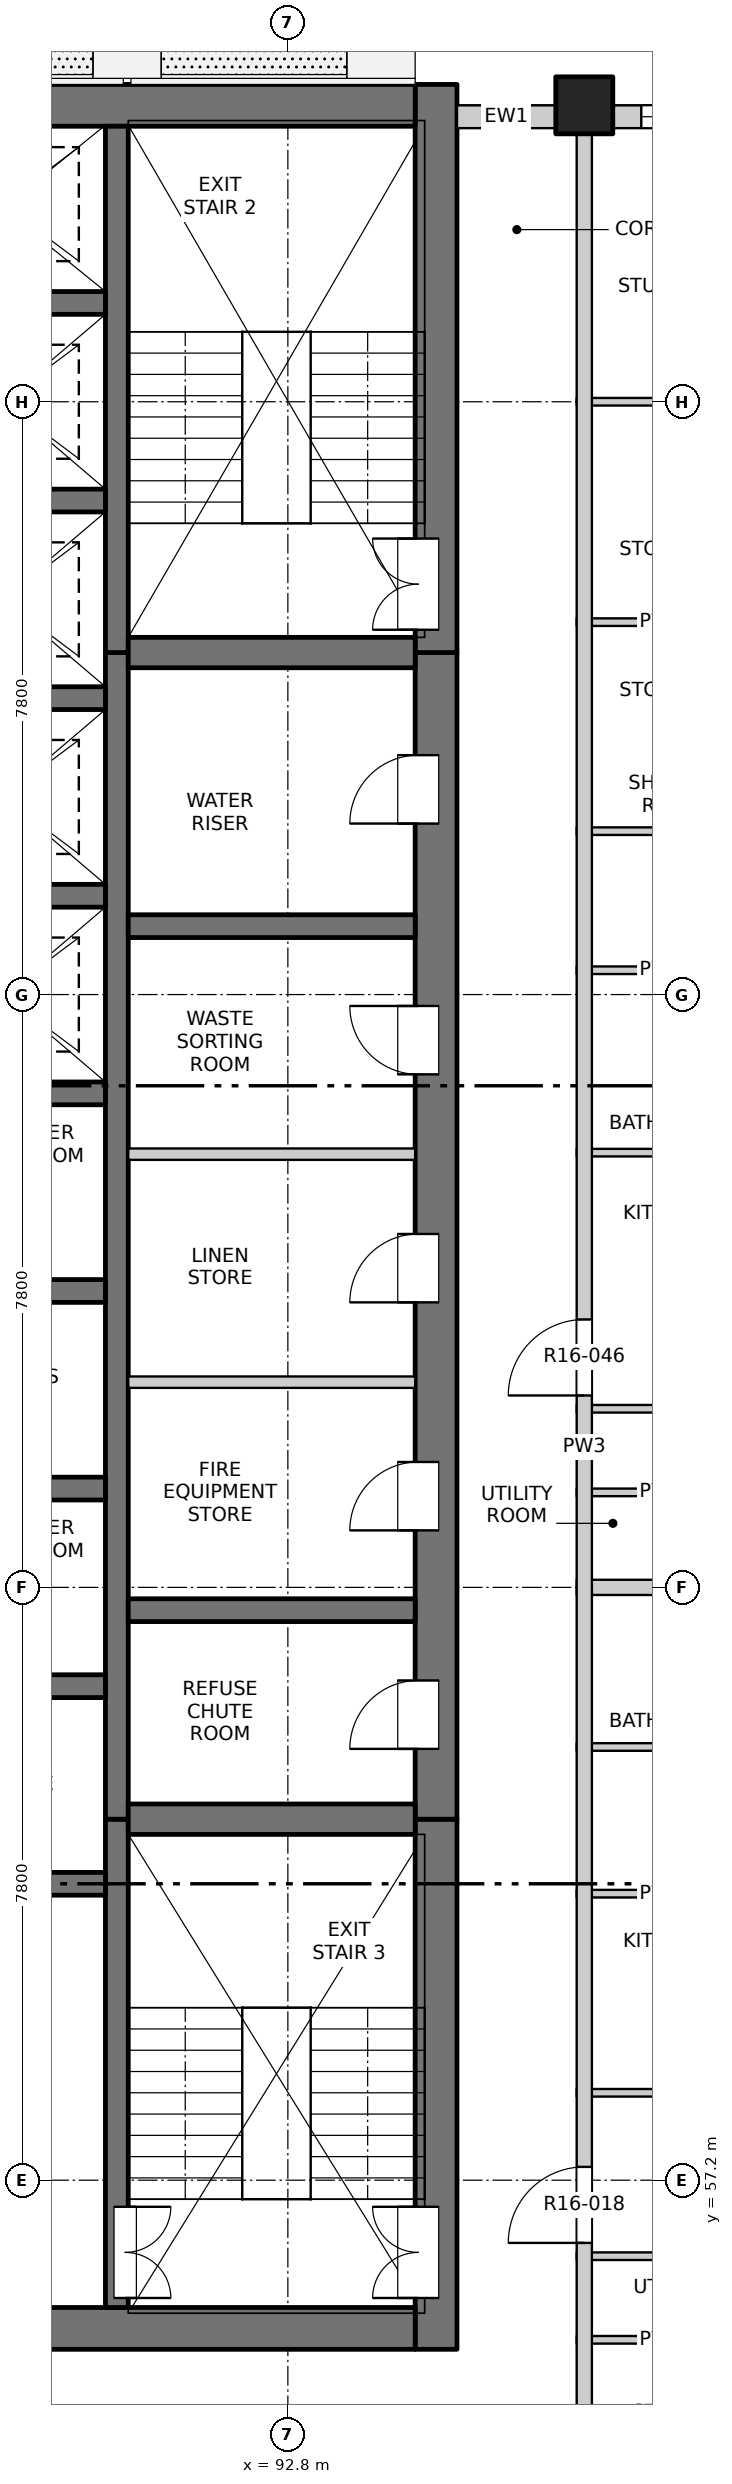
"""IFC4 building model, lengths in metres.
Left out: names, types, materials, properties, quantities, classifications, styles, units other than length and angle.
Written with IfcOpenShell. Run it as: python <this file> out.ifc"""

import sys

from ifc_helpers import new_model, si_unit, direction, frame, frame_2d, origin, origin_2d, place, context, subcontext, project, spatial, rectangle, extrude, element, fill, save


model = new_model("IFC4")
c1 = context("Model", 3, precision=1e-05, world=origin(), true_north=direction((0.0, 1.0)))
c2 = subcontext(c1, "Body", "Model", "MODEL_VIEW")
j1 = project(units=[si_unit("LENGTHUNIT", "METRE"), si_unit("PLANEANGLEUNIT", "RADIAN")], contexts=[c1])
p1 = place(None, origin())
s1 = spatial("IfcSite", under=j1, at=p1, CompositionType="ELEMENT")
p2 = place(p1, origin())
s2 = spatial("IfcBuilding", under=s1, at=p2, CompositionType="ELEMENT")
p3 = place(p2, frame((0.0, 0.0, 169.0)))
s3 = spatial("IfcBuildingStorey", under=s2, at=p3, CompositionType="ELEMENT", Elevation=169.0)
p4 = place(p3, frame((96.7, 84.5, -0.25), z_axis=(0.0, 0.0, 1.0), x_axis=(1.0, 0.0, 0.0)))
e1 = element("IfcColumn", 1, at=p4, inside=s3, PredefinedType="COLUMN", context=c2, shape_type="SweptSolid", body=[
    extrude(rectangle(XDim=0.75, YDim=0.75, at=origin_2d()), origin(), (0.0, 0.0, 1.0), 3.35),
])
p5 = place(p3, frame((94.75, 54.975, -0.25), z_axis=(0.0, 0.0, 1.0), x_axis=(0.0, 1.0, 0.0)))
e2 = element("IfcWall", 2, at=p5, inside=s3, PredefinedType="SOLIDWALL", context=c2, shape_type="SweptSolid", body=[
    extrude(rectangle(XDim=6.975, YDim=0.55, at=frame_2d((3.487, 0.0))), origin(), (0.0, 0.0, 1.0), 3.35),
])
p6 = place(p5, frame((0.675, 0.0, 0.25)))
e3 = element("IfcOpeningElement", 3, at=p6, cuts=e2, PredefinedType="OPENING", context=c2, shape_type="SweptSolid", body=[
    extrude(rectangle(XDim=1.2, YDim=2.1, at=frame_2d((0.6, 1.05))), frame((0.0, 0.285, 0.0), z_axis=(0.0, -1.0, 0.0), x_axis=(1.0, 0.0, 0.0)), (0.0, 0.0, 1.0), 0.57),
])
p7 = place(p3, frame((94.75, 61.95, -0.25), z_axis=(0.0, 0.0, 1.0), x_axis=(0.0, 1.0, 0.0)))
e4 = element("IfcWall", 4, at=p7, inside=s3, PredefinedType="SOLIDWALL", context=c2, shape_type="SweptSolid", body=[
    extrude(rectangle(XDim=15.35, YDim=0.55, at=frame_2d((7.675, 0.0))), origin(), (0.0, 0.0, 1.0), 3.35),
])
p8 = place(p7, frame((0.925, 0.0, 0.25)))
e5 = element("IfcOpeningElement", 5, at=p8, cuts=e4, PredefinedType="OPENING", context=c2, shape_type="SweptSolid", body=[
    extrude(rectangle(XDim=0.9, YDim=2.1, at=frame_2d((0.45, 1.05))), frame((0.0, 0.285, 0.0), z_axis=(0.0, -1.0, 0.0), x_axis=(1.0, 0.0, 0.0)), (0.0, 0.0, 1.0), 0.57),
])
p9 = place(p7, frame((3.8, 0.0, 0.25)))
e6 = element("IfcOpeningElement", 6, at=p9, cuts=e4, PredefinedType="OPENING", context=c2, shape_type="SweptSolid", body=[
    extrude(rectangle(XDim=0.9, YDim=2.1, at=frame_2d((0.45, 1.05))), frame((0.0, 0.285, 0.0), z_axis=(0.0, -1.0, 0.0), x_axis=(1.0, 0.0, 0.0)), (0.0, 0.0, 1.0), 0.57),
])
p10 = place(p7, frame((6.8, 0.0, 0.25)))
e7 = element("IfcOpeningElement", 7, at=p10, cuts=e4, PredefinedType="OPENING", context=c2, shape_type="SweptSolid", body=[
    extrude(rectangle(XDim=0.9, YDim=2.1, at=frame_2d((0.45, 1.05))), frame((0.0, 0.285, 0.0), z_axis=(0.0, -1.0, 0.0), x_axis=(1.0, 0.0, 0.0)), (0.0, 0.0, 1.0), 0.57),
])
p11 = place(p7, frame((9.8, 0.0, 0.25)))
e8 = element("IfcOpeningElement", 8, at=p11, cuts=e4, PredefinedType="OPENING", context=c2, shape_type="SweptSolid", body=[
    extrude(rectangle(XDim=0.9, YDim=2.1, at=frame_2d((0.45, 1.05))), frame((0.0, 0.285, 0.0), z_axis=(0.0, -1.0, 0.0), x_axis=(1.0, 0.0, 0.0)), (0.0, 0.0, 1.0), 0.57),
])
p12 = place(p7, frame((13.1, 0.0, 0.25)))
e9 = element("IfcOpeningElement", 9, at=p12, cuts=e4, PredefinedType="OPENING", context=c2, shape_type="SweptSolid", body=[
    extrude(rectangle(XDim=0.9, YDim=2.1, at=frame_2d((0.45, 1.05))), frame((0.0, 0.285, 0.0), z_axis=(0.0, -1.0, 0.0), x_axis=(1.0, 0.0, 0.0)), (0.0, 0.0, 1.0), 0.57),
])
p13 = place(p3, frame((94.75, 77.3, -0.25), z_axis=(0.0, 0.0, 1.0), x_axis=(0.0, 1.0, 0.0)))
e10 = element("IfcWall", 10, at=p13, inside=s3, PredefinedType="SOLIDWALL", context=c2, shape_type="SweptSolid", body=[
    extrude(rectangle(XDim=7.475, YDim=0.55, at=frame_2d((3.737, 0.0))), origin(), (0.0, 0.0, 1.0), 3.35),
])
p14 = place(p13, frame((0.3, 0.0, 0.25)))
e11 = element("IfcOpeningElement", 11, at=p14, cuts=e10, PredefinedType="OPENING", context=c2, shape_type="SweptSolid", body=[
    extrude(rectangle(XDim=1.2, YDim=2.1, at=frame_2d((0.6, 1.05))), frame((0.0, 0.285, 0.0), z_axis=(0.0, -1.0, 0.0), x_axis=(1.0, 0.0, 0.0)), (0.0, 0.0, 1.0), 0.57),
])
p15 = place(p3, frame((75.525, 55.25, -0.25), z_axis=(0.0, 0.0, 1.0), x_axis=(1.0, 0.0, 0.0)))
e12 = element("IfcWall", 12, at=p15, inside=s3, PredefinedType="SOLIDWALL", context=c2, shape_type="SweptSolid", body=[
    extrude(rectangle(XDim=18.95, YDim=0.55, at=frame_2d((9.475, 0.0))), origin(), (0.0, 0.0, 1.0), 3.35),
])
p16 = place(p15, frame((8.725, 0.0, 0.25)))
e13 = element("IfcOpeningElement", 13, at=p16, cuts=e12, PredefinedType="OPENING", context=c2, shape_type="SweptSolid", body=[
    extrude(rectangle(XDim=1.5, YDim=2.1, at=frame_2d((0.75, 1.05))), frame((0.0, 0.285, 0.0), z_axis=(0.0, -1.0, 0.0), x_axis=(1.0, 0.0, 0.0)), (0.0, 0.0, 1.0), 0.57),
])
p17 = place(p3, frame((75.525, 84.5, -0.25), z_axis=(0.0, 0.0, 1.0), x_axis=(1.0, 0.0, 0.0)))
e14 = element("IfcWall", 14, at=p17, inside=s3, PredefinedType="SOLIDWALL", context=c2, shape_type="SweptSolid", body=[
    extrude(rectangle(XDim=18.95, YDim=0.55, at=frame_2d((9.475, 0.0))), origin(), (0.0, 0.0, 1.0), 3.35),
])
p18 = place(p3, frame((90.55, 55.525, -0.25), z_axis=(0.0, 0.0, 1.0), x_axis=(0.0, 1.0, 0.0)))
e15 = element("IfcWall", 15, at=p18, inside=s3, PredefinedType="SOLIDWALL", context=c2, shape_type="SweptSolid", body=[
    extrude(rectangle(XDim=6.425, YDim=0.3, at=frame_2d((3.212, 0.0))), origin(), (0.0, 0.0, 1.0), 3.35),
])
p19 = place(p18, frame((0.125, 0.0, 0.25)))
e16 = element("IfcOpeningElement", 16, at=p19, cuts=e15, PredefinedType="OPENING", context=c2, shape_type="SweptSolid", body=[
    extrude(rectangle(XDim=1.2, YDim=2.1, at=frame_2d((0.6, 1.05))), frame((0.0, 0.16, 0.0), z_axis=(0.0, -1.0, 0.0), x_axis=(1.0, 0.0, 0.0)), (0.0, 0.0, 1.0), 0.32),
])
p20 = place(p3, frame((90.55, 61.95, -0.25), z_axis=(0.0, 0.0, 1.0), x_axis=(0.0, 1.0, 0.0)))
e17 = element("IfcWall", 17, at=p20, inside=s3, PredefinedType="SOLIDWALL", context=c2, shape_type="SweptSolid", body=[
    extrude(rectangle(XDim=15.35, YDim=0.3, at=frame_2d((7.675, 0.0))), origin(), (0.0, 0.0, 1.0), 3.35),
])
p21 = place(p3, frame((90.55, 77.3, -0.25), z_axis=(0.0, 0.0, 1.0), x_axis=(0.0, 1.0, 0.0)))
e18 = element("IfcWall", 18, at=p21, inside=s3, PredefinedType="SOLIDWALL", context=c2, shape_type="SweptSolid", body=[
    extrude(rectangle(XDim=6.925, YDim=0.3, at=frame_2d((3.462, 0.0))), origin(), (0.0, 0.0, 1.0), 3.35),
])
for number, where, z_axis, x_axis in (
    (19, (87.4, 61.1, -0.25), (0.0, 0.0, 1.0), (1.0, 0.0, 0.0)),
    (20, (87.4, 63.7, -0.25), (0.0, 0.0, 1.0), (1.0, 0.0, 0.0)),
    (21, (87.4, 66.3, -0.25), (0.0, 0.0, 1.0), (1.0, 0.0, 0.0)),
    (22, (87.4, 68.9, -0.25), (0.0, 0.0, 1.0), (1.0, 0.0, 0.0)),
    (23, (87.4, 71.5, -0.25), (0.0, 0.0, 1.0), (1.0, 0.0, 0.0)),
    (24, (87.4, 74.1, -0.25), (0.0, 0.0, 1.0), (1.0, 0.0, 0.0)),
    (25, (87.4, 76.7, -0.25), (0.0, 0.0, 1.0), (1.0, 0.0, 0.0)),
    (26, (87.4, 79.3, -0.25), (0.0, 0.0, 1.0), (1.0, 0.0, 0.0)),
    (27, (87.4, 81.9, -0.25), (0.0, 0.0, 1.0), (1.0, 0.0, 0.0)),
):
    element("IfcWall", number, at=place(p3, frame(where, z_axis=z_axis, x_axis=x_axis)), inside=s3, PredefinedType="SOLIDWALL", context=c2, shape_type="SweptSolid", body=[
        extrude(rectangle(XDim=3.0, YDim=0.3, at=frame_2d((1.5, 0.0))), origin(), (0.0, 0.0, 1.0), 3.35),
    ])
p22 = place(p3, frame((90.7, 61.95, -0.25), z_axis=(0.0, 0.0, 1.0), x_axis=(1.0, 0.0, 0.0)))
e28 = element("IfcWall", 28, at=p22, inside=s3, PredefinedType="SOLIDWALL", context=c2, shape_type="SweptSolid", body=[
    extrude(rectangle(XDim=3.775, YDim=0.4, at=frame_2d((1.888, 0.0))), origin(), (0.0, 0.0, 1.0), 3.35),
])
for number, where, z_axis, x_axis in (
    (29, (90.7, 64.7, -0.25), (0.0, 0.0, 1.0), (1.0, 0.0, 0.0)),
    (30, (90.7, 73.7, -0.25), (0.0, 0.0, 1.0), (1.0, 0.0, 0.0)),
):
    element("IfcWall", number, at=place(p3, frame(where, z_axis=z_axis, x_axis=x_axis)), inside=s3, PredefinedType="SOLIDWALL", context=c2, shape_type="SweptSolid", body=[
        extrude(rectangle(XDim=3.775, YDim=0.3, at=frame_2d((1.888, 0.0))), origin(), (0.0, 0.0, 1.0), 3.35),
    ])
p23 = place(p3, frame((90.7, 77.3, -0.25), z_axis=(0.0, 0.0, 1.0), x_axis=(1.0, 0.0, 0.0)))
e31 = element("IfcWall", 31, at=p23, inside=s3, PredefinedType="SOLIDWALL", context=c2, shape_type="SweptSolid", body=[
    extrude(rectangle(XDim=3.775, YDim=0.4, at=frame_2d((1.888, 0.0))), origin(), (0.0, 0.0, 1.0), 3.35),
])
p24 = place(p3, frame((95.025, 84.35, 0.0), z_axis=(0.0, 0.0, 1.0), x_axis=(1.0, 0.0, 0.0)))
e32 = element("IfcWall", 32, at=p24, inside=s3, PredefinedType="SOLIDWALL", context=c2, shape_type="SweptSolid", body=[
    extrude(rectangle(XDim=1.3, YDim=0.3, at=frame_2d((0.65, 0.0))), origin(), (0.0, 0.0, 1.0), 3.1),
])
p25 = place(p3, frame((97.075, 84.35, 0.0), z_axis=(0.0, 0.0, 1.0), x_axis=(1.0, 0.0, 0.0)))
e33 = element("IfcWall", 33, at=p25, inside=s3, PredefinedType="SOLIDWALL", context=c2, shape_type="SweptSolid", body=[
    extrude(rectangle(XDim=3.525, YDim=0.3, at=frame_2d((1.763, 0.0))), origin(), (0.0, 0.0, 1.0), 3.1),
])
p26 = place(p25, frame((0.375, 0.0, 0.9)))
e34 = element("IfcOpeningElement", 34, at=p26, cuts=e33, PredefinedType="OPENING", context=c2, shape_type="SweptSolid", body=[
    extrude(rectangle(XDim=2.4, YDim=1.8, at=frame_2d((1.2, 0.9))), frame((0.0, 0.16, 0.0), z_axis=(0.0, -1.0, 0.0), x_axis=(1.0, 0.0, 0.0)), (0.0, 0.0, 1.0), 0.32),
])
for number, where, z_axis, x_axis in (
    (35, (96.6, 55.1, 0.0), (0.0, 0.0, 1.0), (1.0, 0.0, 0.0)),
    (36, (96.6, 56.2, 0.0), (0.0, 0.0, 1.0), (1.0, 0.0, 0.0)),
    (37, (96.6, 58.35, 0.0), (0.0, 0.0, 1.0), (1.0, 0.0, 0.0)),
    (38, (96.6, 60.97, 0.0), (0.0, 0.0, 1.0), (1.0, 0.0, 0.0)),
    (39, (96.6, 62.9, 0.0), (0.0, 0.0, 1.0), (1.0, 0.0, 0.0)),
):
    element("IfcWall", number, at=place(p3, frame(where, z_axis=z_axis, x_axis=x_axis)), inside=s3, PredefinedType="PARTITIONING", context=c2, shape_type="SweptSolid", body=[
        extrude(rectangle(XDim=2.22, YDim=0.1, at=frame_2d((1.11, 0.0))), origin(), (0.0, 0.0, 1.0), 3.1),
    ])
p27 = place(p3, frame((96.6, 65.0, 0.0), z_axis=(0.0, 0.0, 1.0), x_axis=(1.0, 0.0, 0.0)))
e40 = element("IfcWall", 40, at=p27, inside=s3, PredefinedType="PARTITIONING", context=c2, shape_type="SweptSolid", body=[
    extrude(rectangle(XDim=7.6, YDim=0.2, at=frame_2d((3.8, 0.0))), origin(), (0.0, 0.0, 1.0), 3.1),
])
for number, where, z_axis, x_axis in (
    (41, (96.6, 66.25, 0.0), (0.0, 0.0, 1.0), (1.0, 0.0, 0.0)),
    (42, (96.6, 67.35, 0.0), (0.0, 0.0, 1.0), (1.0, 0.0, 0.0)),
):
    element("IfcWall", number, at=place(p3, frame(where, z_axis=z_axis, x_axis=x_axis)), inside=s3, PredefinedType="PARTITIONING", context=c2, shape_type="SweptSolid", body=[
        extrude(rectangle(XDim=2.22, YDim=0.1, at=frame_2d((1.11, 0.0))), origin(), (0.0, 0.0, 1.0), 3.1),
    ])
for number, where, z_axis, x_axis in (
    (43, (90.7, 67.7, 0.0), (0.0, 0.0, 1.0), (1.0, 0.0, 0.0)),
    (44, (90.7, 70.7, 0.0), (0.0, 0.0, 1.0), (1.0, 0.0, 0.0)),
):
    element("IfcWall", number, at=place(p3, frame(where, z_axis=z_axis, x_axis=x_axis)), inside=s3, PredefinedType="PARTITIONING", context=c2, shape_type="SweptSolid", body=[
        extrude(rectangle(XDim=3.775, YDim=0.15, at=frame_2d((1.887, 0.0))), origin(), (0.0, 0.0, 1.0), 3.1),
    ])
for number, where, z_axis, x_axis in (
    (45, (96.6, 70.72, 0.0), (0.0, 0.0, 1.0), (1.0, 0.0, 0.0)),
    (46, (96.6, 73.12, 0.0), (0.0, 0.0, 1.0), (1.0, 0.0, 0.0)),
    (47, (96.6, 74.95, 0.0), (0.0, 0.0, 1.0), (1.0, 0.0, 0.0)),
    (48, (96.6, 77.7, 0.0), (0.0, 0.0, 1.0), (1.0, 0.0, 0.0)),
):
    element("IfcWall", number, at=place(p3, frame(where, z_axis=z_axis, x_axis=x_axis)), inside=s3, PredefinedType="PARTITIONING", context=c2, shape_type="SweptSolid", body=[
        extrude(rectangle(XDim=2.22, YDim=0.1, at=frame_2d((1.11, 0.0))), origin(), (0.0, 0.0, 1.0), 3.1),
    ])
p28 = place(p3, frame((96.6, 80.6, 0.0), z_axis=(0.0, 0.0, 1.0), x_axis=(1.0, 0.0, 0.0)))
e49 = element("IfcWall", 49, at=p28, inside=s3, PredefinedType="PARTITIONING", context=c2, shape_type="SweptSolid", body=[
    extrude(rectangle(XDim=7.6, YDim=0.1, at=frame_2d((3.8, 0.0))), origin(), (0.0, 0.0, 1.0), 3.1),
])
p29 = place(p28, frame((2.56, 0.0, 0.0)))
e50 = element("IfcOpeningElement", 50, at=p29, cuts=e49, PredefinedType="OPENING", context=c2, shape_type="SweptSolid", body=[
    extrude(rectangle(XDim=0.9, YDim=2.1, at=frame_2d((0.45, 1.05))), frame((0.0, 0.06, 0.0), z_axis=(0.0, -1.0, 0.0), x_axis=(1.0, 0.0, 0.0)), (0.0, 0.0, 1.0), 0.12),
])
p30 = place(p3, frame((96.7, 49.5, 0.0), z_axis=(0.0, 0.0, 1.0), x_axis=(0.0, 1.0, 0.0)))
e51 = element("IfcWall", 51, at=p30, inside=s3, PredefinedType="PARTITIONING", context=c2, shape_type="SweptSolid", body=[
    extrude(rectangle(XDim=34.7, YDim=0.2, at=frame_2d((17.35, 0.0))), origin(), (0.0, 0.0, 1.0), 3.1),
])
p31 = place(p30, frame((6.875, 0.0, 0.0)))
e52 = element("IfcOpeningElement", 52, at=p31, cuts=e51, PredefinedType="OPENING", context=c2, shape_type="SweptSolid", body=[
    extrude(rectangle(XDim=1.0, YDim=2.1, at=frame_2d((0.5, 1.05))), frame((0.0, 0.11, 0.0), z_axis=(0.0, -1.0, 0.0), x_axis=(1.0, 0.0, 0.0)), (0.0, 0.0, 1.0), 0.22),
])
p32 = place(p30, frame((18.025, 0.0, 0.0)))
e53 = element("IfcOpeningElement", 53, at=p32, cuts=e51, PredefinedType="OPENING", context=c2, shape_type="SweptSolid", body=[
    extrude(rectangle(XDim=1.0, YDim=2.1, at=frame_2d((0.5, 1.05))), frame((0.0, 0.11, 0.0), z_axis=(0.0, -1.0, 0.0), x_axis=(1.0, 0.0, 0.0)), (0.0, 0.0, 1.0), 0.22),
])
p33 = place(p26, origin())
e54 = element("IfcWindow", 54, at=p33, inside=s3, PartitioningType="DOUBLE_PANEL_VERTICAL", PredefinedType="WINDOW", context=c2, shape_type="SweptSolid", body=[
    extrude(rectangle(XDim=2.4, YDim=1.8, at=frame_2d((1.2, 0.9))), frame((0.0, 0.03, 0.0), z_axis=(0.0, -1.0, 0.0), x_axis=(1.0, 0.0, 0.0)), (0.0, 0.0, 1.0), 0.06),
])
fill(e34, e54)
p34 = place(p19, origin())
e55 = element("IfcDoor", 55, at=p34, inside=s3, OperationType="DOUBLE_DOOR_SINGLE_SWING", PredefinedType="DOOR", context=c2, shape_type="SweptSolid", body=[
    extrude(rectangle(XDim=1.2, YDim=2.1, at=frame_2d((0.6, 1.05))), frame((0.0, -0.085, 0.0), z_axis=(0.0, -1.0, 0.0), x_axis=(1.0, 0.0, 0.0)), (0.0, 0.0, 1.0), 0.05),
])
fill(e16, e55)
p35 = place(p6, origin())
e56 = element("IfcDoor", 56, at=p35, inside=s3, OperationType="DOUBLE_DOOR_SINGLE_SWING", PredefinedType="DOOR", context=c2, shape_type="SweptSolid", body=[
    extrude(rectangle(XDim=1.2, YDim=2.1, at=frame_2d((0.6, 1.05))), frame((0.0, 0.26, 0.0), z_axis=(0.0, -1.0, 0.0), x_axis=(1.0, 0.0, 0.0)), (0.0, 0.0, 1.0), 0.05),
])
fill(e3, e56)
p36 = place(p31, origin())
e57 = element("IfcDoor", 57, at=p36, inside=s3, OperationType="SINGLE_SWING_LEFT", PredefinedType="DOOR", context=c2, shape_type="SweptSolid", body=[
    extrude(rectangle(XDim=1.0, YDim=2.1, at=frame_2d((0.5, 1.05))), frame((0.0, 0.025, 0.0), z_axis=(0.0, -1.0, 0.0), x_axis=(1.0, 0.0, 0.0)), (0.0, 0.0, 1.0), 0.05),
])
fill(e52, e57)
p37 = place(p8, origin())
e58 = element("IfcDoor", 58, at=p37, inside=s3, OperationType="SINGLE_SWING_LEFT", PredefinedType="DOOR", context=c2, shape_type="SweptSolid", body=[
    extrude(rectangle(XDim=0.9, YDim=2.1, at=frame_2d((0.45, 1.05))), frame((0.0, 0.26, 0.0), z_axis=(0.0, -1.0, 0.0), x_axis=(1.0, 0.0, 0.0)), (0.0, 0.0, 1.0), 0.05),
])
fill(e5, e58)
p38 = place(p9, origin())
e59 = element("IfcDoor", 59, at=p38, inside=s3, OperationType="SINGLE_SWING_LEFT", PredefinedType="DOOR", context=c2, shape_type="SweptSolid", body=[
    extrude(rectangle(XDim=0.9, YDim=2.1, at=frame_2d((0.45, 1.05))), frame((0.0, 0.26, 0.0), z_axis=(0.0, -1.0, 0.0), x_axis=(1.0, 0.0, 0.0)), (0.0, 0.0, 1.0), 0.05),
])
fill(e6, e59)
p39 = place(p32, origin())
e60 = element("IfcDoor", 60, at=p39, inside=s3, OperationType="SINGLE_SWING_LEFT", PredefinedType="DOOR", context=c2, shape_type="SweptSolid", body=[
    extrude(rectangle(XDim=1.0, YDim=2.1, at=frame_2d((0.5, 1.05))), frame((0.0, 0.025, 0.0), z_axis=(0.0, -1.0, 0.0), x_axis=(1.0, 0.0, 0.0)), (0.0, 0.0, 1.0), 0.05),
])
fill(e53, e60)
p40 = place(p10, origin())
e61 = element("IfcDoor", 61, at=p40, inside=s3, OperationType="SINGLE_SWING_LEFT", PredefinedType="DOOR", context=c2, shape_type="SweptSolid", body=[
    extrude(rectangle(XDim=0.9, YDim=2.1, at=frame_2d((0.45, 1.05))), frame((0.0, 0.26, 0.0), z_axis=(0.0, -1.0, 0.0), x_axis=(1.0, 0.0, 0.0)), (0.0, 0.0, 1.0), 0.05),
])
fill(e7, e61)
p41 = place(p11, origin())
e62 = element("IfcDoor", 62, at=p41, inside=s3, OperationType="SINGLE_SWING_RIGHT", PredefinedType="DOOR", context=c2, shape_type="SweptSolid", body=[
    extrude(rectangle(XDim=0.9, YDim=2.1, at=frame_2d((0.45, 1.05))), frame((0.0, 0.26, 0.0), z_axis=(0.0, -1.0, 0.0), x_axis=(1.0, 0.0, 0.0)), (0.0, 0.0, 1.0), 0.05),
])
fill(e8, e62)
p42 = place(p12, origin())
e63 = element("IfcDoor", 63, at=p42, inside=s3, OperationType="SINGLE_SWING_LEFT", PredefinedType="DOOR", context=c2, shape_type="SweptSolid", body=[
    extrude(rectangle(XDim=0.9, YDim=2.1, at=frame_2d((0.45, 1.05))), frame((0.0, 0.26, 0.0), z_axis=(0.0, -1.0, 0.0), x_axis=(1.0, 0.0, 0.0)), (0.0, 0.0, 1.0), 0.05),
])
fill(e9, e63)
p43 = place(p14, origin())
e64 = element("IfcDoor", 64, at=p43, inside=s3, OperationType="DOUBLE_DOOR_SINGLE_SWING", PredefinedType="DOOR", context=c2, shape_type="SweptSolid", body=[
    extrude(rectangle(XDim=1.2, YDim=2.1, at=frame_2d((0.6, 1.05))), frame((0.0, 0.26, 0.0), z_axis=(0.0, -1.0, 0.0), x_axis=(1.0, 0.0, 0.0)), (0.0, 0.0, 1.0), 0.05),
])
fill(e11, e64)
save(model, sys.argv[1])
